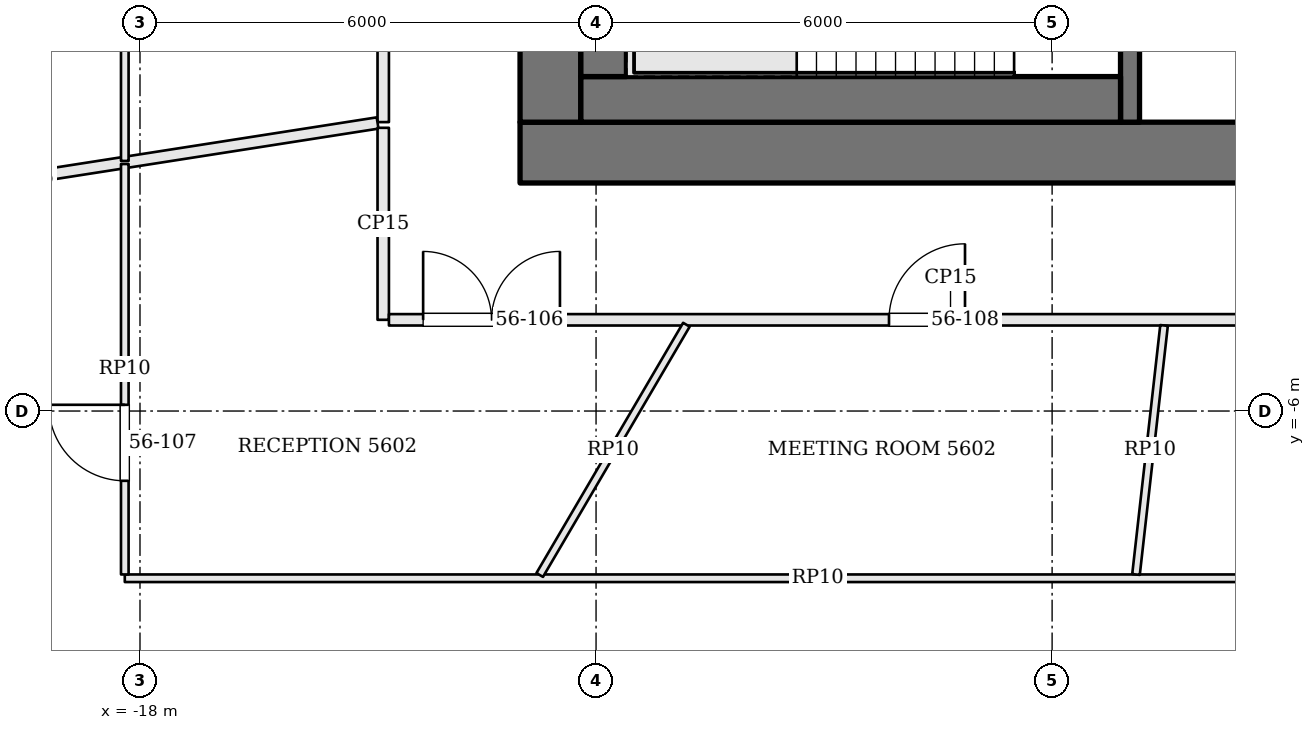
"""IFC4 building model, lengths in metres.
Left out: names, types, materials, properties, quantities, classifications, styles, units other than length and angle.
Written with IfcOpenShell. Run it as: python <this file> out.ifc"""

import sys

from ifc_helpers import new_model, si_unit, direction, frame, frame_2d, origin, place, context, subcontext, project, spatial, rectangle, extrude, element, fill, save


model = new_model("IFC4")
c1 = context("Model", 3, precision=1e-05, world=origin(), true_north=direction((0.0, 1.0)))
c2 = subcontext(c1, "Body", "Model", "MODEL_VIEW")
j1 = project(units=[si_unit("LENGTHUNIT", "METRE"), si_unit("PLANEANGLEUNIT", "RADIAN")], contexts=[c1])
p1 = place(None, origin())
s1 = spatial("IfcSite", under=j1, at=p1, CompositionType="ELEMENT")
p2 = place(p1, origin())
s2 = spatial("IfcBuilding", under=s1, at=p2, CompositionType="ELEMENT")
p3 = place(p2, frame((0.0, 0.0, 229.2)))
s3 = spatial("IfcBuildingStorey", under=s2, at=p3, CompositionType="ELEMENT", Elevation=229.2)
p4 = place(p3, frame((-13.0, -2.6, 0.0), z_axis=(0.0, 0.0, 1.0), x_axis=(1.0, 0.0, 0.0)))
e1 = element("IfcWall", 1, at=p4, inside=s3, PredefinedType="SHEAR", context=c2, shape_type="SweptSolid", body=[
    extrude(rectangle(XDim=26.0, YDim=0.8, at=frame_2d((13.0, 0.0))), origin(), (0.0, 0.0, 1.0), 3.9),
])
p5 = place(p4, frame((9.475, 0.0, 0.0)))
e2 = element("IfcOpeningElement", 2, at=p5, cuts=e1, PredefinedType="OPENING", context=c2, shape_type="SweptSolid", body=[
    extrude(rectangle(XDim=0.9, YDim=2.1, at=frame_2d((0.45, 1.05))), frame((0.0, 0.41, 0.0), z_axis=(0.0, -1.0, 0.0), x_axis=(1.0, 0.0, 0.0)), (0.0, 0.0, 1.0), 0.82),
])
p6 = place(p4, frame((12.75, 0.0, 0.0)))
e3 = element("IfcOpeningElement", 3, at=p6, cuts=e1, PredefinedType="OPENING", context=c2, shape_type="SweptSolid", body=[
    extrude(rectangle(XDim=0.9, YDim=2.1, at=frame_2d((0.45, 1.05))), frame((0.0, 0.41, 0.0), z_axis=(0.0, -1.0, 0.0), x_axis=(1.0, 0.0, 0.0)), (0.0, 0.0, 1.0), 0.82),
])
p7 = place(p4, frame((15.05, 0.0, 0.0)))
e4 = element("IfcOpeningElement", 4, at=p7, cuts=e1, PredefinedType="OPENING", context=c2, shape_type="SweptSolid", body=[
    extrude(rectangle(XDim=1.0, YDim=2.1, at=frame_2d((0.5, 1.05))), frame((0.0, 0.41, 0.0), z_axis=(0.0, -1.0, 0.0), x_axis=(1.0, 0.0, 0.0)), (0.0, 0.0, 1.0), 0.82),
])
p8 = place(p4, frame((16.825, 0.0, 0.0)))
e5 = element("IfcOpeningElement", 5, at=p8, cuts=e1, PredefinedType="OPENING", context=c2, shape_type="SweptSolid", body=[
    extrude(rectangle(XDim=0.7, YDim=2.1, at=frame_2d((0.35, 1.05))), frame((0.0, 0.41, 0.0), z_axis=(0.0, -1.0, 0.0), x_axis=(1.0, 0.0, 0.0)), (0.0, 0.0, 1.0), 0.82),
])
p9 = place(p3, frame((-12.6, -2.2, 0.0), z_axis=(0.0, 0.0, 1.0), x_axis=(0.0, 1.0, 0.0)))
e6 = element("IfcWall", 6, at=p9, inside=s3, PredefinedType="SHEAR", context=c2, shape_type="SweptSolid", body=[
    extrude(rectangle(XDim=13.4, YDim=0.8, at=frame_2d((6.7, 0.0))), origin(), (0.0, 0.0, 1.0), 3.9),
])
p10 = place(p9, frame((4.2, 0.0, 0.0)))
e7 = element("IfcOpeningElement", 7, at=p10, cuts=e6, PredefinedType="OPENING", context=c2, shape_type="SweptSolid", body=[
    extrude(rectangle(XDim=1.8, YDim=2.1, at=frame_2d((0.9, 1.05))), frame((0.0, 0.41, 0.0), z_axis=(0.0, -1.0, 0.0), x_axis=(1.0, 0.0, 0.0)), (0.0, 0.0, 1.0), 0.82),
])
p11 = place(p3, frame((-4.975, -2.2, 0.0), z_axis=(0.0, 0.0, 1.0), x_axis=(0.0, 1.0, 0.0)))
e8 = element("IfcWall", 8, at=p11, inside=s3, PredefinedType="SOLIDWALL", context=c2, shape_type="SweptSolid", body=[
    extrude(rectangle(XDim=13.4, YDim=0.25, at=frame_2d((6.7, 0.0))), origin(), (0.0, 0.0, 1.0), 3.7),
])
p12 = place(p11, frame((5.25, 0.0, 0.0)))
e9 = element("IfcOpeningElement", 9, at=p12, cuts=e8, PredefinedType="OPENING", context=c2, shape_type="SweptSolid", body=[
    extrude(rectangle(XDim=1.2, YDim=2.1, at=frame_2d((0.6, 1.05))), frame((0.0, 0.135, 0.0), z_axis=(0.0, -1.0, 0.0), x_axis=(1.0, 0.0, 0.0)), (0.0, 0.0, 1.0), 0.27),
])
p13 = place(p3, frame((-12.2, -1.9, 0.0), z_axis=(0.0, 0.0, 1.0), x_axis=(1.0, 0.0, 0.0)))
e10 = element("IfcWall", 10, at=p13, inside=s3, PredefinedType="SOLIDWALL", context=c2, shape_type="SweptSolid", body=[
    extrude(rectangle(XDim=7.1, YDim=0.6, at=frame_2d((3.55, 0.0))), origin(), (0.0, 0.0, 1.0), 3.7),
])
p14 = place(p3, frame((-11.9, -1.6, 0.0), z_axis=(0.0, 0.0, 1.0), x_axis=(0.0, 1.0, 0.0)))
e11 = element("IfcWall", 11, at=p14, inside=s3, PredefinedType="SOLIDWALL", context=c2, shape_type="SweptSolid", body=[
    extrude(rectangle(XDim=2.95, YDim=0.6, at=frame_2d((1.475, 0.0))), origin(), (0.0, 0.0, 1.0), 3.7),
])
p15 = place(p3, frame((-14.8, 13.725, 0.0), z_axis=(0.0, 0.0, 1.0), x_axis=(0.0, -1.0, 0.0)))
e12 = element("IfcWall", 12, at=p15, inside=s3, PredefinedType="PARTITIONING", context=c2, shape_type="SweptSolid", body=[
    extrude(rectangle(XDim=15.924, YDim=0.15, at=frame_2d((7.962, 0.0))), origin(), (0.0, 0.0, 1.0), 3.084),
])
p16 = place(p15, frame((0.57, 0.0, 0.0)))
e13 = element("IfcOpeningElement", 13, at=p16, cuts=e12, PredefinedType="OPENING", context=c2, shape_type="SweptSolid", body=[
    extrude(rectangle(XDim=1.0, YDim=2.4, at=frame_2d((0.5, 1.2))), frame((0.0, 0.085, 0.0), z_axis=(0.0, -1.0, 0.0), x_axis=(1.0, 0.0, 0.0)), (0.0, 0.0, 1.0), 0.17),
])
p17 = place(p3, frame((-24.077, -3.648, 0.0), z_axis=(0.0, 0.0, 1.0), x_axis=(0.988026771809, 0.154282527163, 0.0)))
e14 = element("IfcWall", 14, at=p17, inside=s3, PredefinedType="PARTITIONING", context=c2, shape_type="SweptSolid", body=[
    extrude(rectangle(XDim=9.314, YDim=0.15, at=frame_2d((4.657, 0.0))), origin(), (0.0, 0.0, 1.0), 3.234),
])
p18 = place(p3, frame((-14.8, -2.274, 0.0), z_axis=(0.0, 0.0, 1.0), x_axis=(0.0, -1.0, 0.0)))
e15 = element("IfcWall", 15, at=p18, inside=s3, PredefinedType="PARTITIONING", context=c2, shape_type="SweptSolid", body=[
    extrude(rectangle(XDim=2.526, YDim=0.15, at=frame_2d((1.263, 0.0))), origin(), (0.0, 0.0, 1.0), 3.084),
])
p19 = place(p3, frame((-14.725, -4.8, 0.0), z_axis=(0.0, 0.0, 1.0), x_axis=(1.0, 0.0, 0.0)))
e16 = element("IfcWall", 16, at=p19, inside=s3, PredefinedType="PARTITIONING", context=c2, shape_type="SweptSolid", body=[
    extrude(rectangle(XDim=14.777, YDim=0.15, at=frame_2d((7.389, 0.0))), origin(), (0.0, 0.0, 1.0), 3.084),
])
p20 = place(p19, frame((0.45, 0.0, 0.0)))
e17 = element("IfcOpeningElement", 17, at=p20, cuts=e16, PredefinedType="OPENING", context=c2, shape_type="SweptSolid", body=[
    extrude(rectangle(XDim=1.8, YDim=2.1, at=frame_2d((0.9, 1.05))), frame((0.0, 0.085, 0.0), z_axis=(0.0, -1.0, 0.0), x_axis=(1.0, 0.0, 0.0)), (0.0, 0.0, 1.0), 0.17),
])
p21 = place(p19, frame((6.579, 0.0, 0.0)))
e18 = element("IfcOpeningElement", 18, at=p21, cuts=e16, PredefinedType="OPENING", context=c2, shape_type="SweptSolid", body=[
    extrude(rectangle(XDim=1.0, YDim=2.4, at=frame_2d((0.5, 1.2))), frame((0.0, 0.085, 0.0), z_axis=(0.0, -1.0, 0.0), x_axis=(1.0, 0.0, 0.0)), (0.0, 0.0, 1.0), 0.17),
])
p22 = place(p3, frame((-18.2, -2.71, 0.0), z_axis=(0.0, 0.0, 1.0), x_axis=(0.0, 1.0, 0.0)))
e19 = element("IfcWall", 19, at=p22, inside=s3, PredefinedType="PARTITIONING", context=c2, shape_type="SweptSolid", body=[
    extrude(rectangle(XDim=17.561, YDim=0.1, at=frame_2d((8.781, 0.0))), origin(), (0.0, 0.0, 1.0), 3.084),
])
p23 = place(p22, frame((8.778, 0.0, 0.0)))
e20 = element("IfcOpeningElement", 20, at=p23, cuts=e19, PredefinedType="OPENING", context=c2, shape_type="SweptSolid", body=[
    extrude(rectangle(XDim=0.9, YDim=2.1, at=frame_2d((0.45, 1.05))), frame((0.0, 0.06, 0.0), z_axis=(0.0, -1.0, 0.0), x_axis=(1.0, 0.0, 0.0)), (0.0, 0.0, 1.0), 0.12),
])
p24 = place(p22, frame((2.883, 0.0, 0.0)))
e21 = element("IfcOpeningElement", 21, at=p24, cuts=e19, PredefinedType="OPENING", context=c2, shape_type="SweptSolid", body=[
    extrude(rectangle(XDim=0.9, YDim=2.1, at=frame_2d((0.45, 1.05))), frame((0.0, 0.06, 0.0), z_axis=(0.0, -1.0, 0.0), x_axis=(1.0, 0.0, 0.0)), (0.0, 0.0, 1.0), 0.12),
])
p25 = place(p3, frame((0.034, -8.2, 0.0), z_axis=(0.0, 0.0, 1.0), x_axis=(-1.0, 0.0, 0.0)))
e22 = element("IfcWall", 22, at=p25, inside=s3, PredefinedType="PARTITIONING", context=c2, shape_type="SweptSolid", body=[
    extrude(rectangle(XDim=18.234, YDim=0.1, at=frame_2d((9.117, 0.0))), origin(), (0.0, 0.0, 1.0), 3.084),
])
p26 = place(p25, frame((2.31, 0.0, 0.0)))
e23 = element("IfcOpeningElement", 23, at=p26, cuts=e22, PredefinedType="OPENING", context=c2, shape_type="SweptSolid", body=[
    extrude(rectangle(XDim=0.9, YDim=2.1, at=frame_2d((0.45, 1.05))), frame((0.0, 0.06, 0.0), z_axis=(0.0, -1.0, 0.0), x_axis=(1.0, 0.0, 0.0)), (0.0, 0.0, 1.0), 0.12),
])
p27 = place(p3, frame((-18.2, -8.15, 0.0), z_axis=(0.0, 0.0, 1.0), x_axis=(0.0, 1.0, 0.0)))
e24 = element("IfcWall", 24, at=p27, inside=s3, PredefinedType="PARTITIONING", context=c2, shape_type="SweptSolid", body=[
    extrude(rectangle(XDim=5.4, YDim=0.1, at=frame_2d((2.7, 0.0))), origin(), (0.0, 0.0, 1.0), 3.084),
])
p28 = place(p27, frame((1.232, 0.0, 0.0)))
e25 = element("IfcOpeningElement", 25, at=p28, cuts=e24, PredefinedType="OPENING", context=c2, shape_type="SweptSolid", body=[
    extrude(rectangle(XDim=1.0, YDim=2.1, at=frame_2d((0.5, 1.05))), frame((0.0, 0.06, 0.0), z_axis=(0.0, -1.0, 0.0), x_axis=(1.0, 0.0, 0.0)), (0.0, 0.0, 1.0), 0.12),
])
p29 = place(p3, frame((-10.811, -4.865, 0.0), z_axis=(0.0, 0.0, 1.0), x_axis=(-0.505719499712, -0.862697970098, 0.0)))
e26 = element("IfcWall", 26, at=p29, inside=s3, PredefinedType="PARTITIONING", context=c2, shape_type="SweptSolid", body=[
    extrude(rectangle(XDim=3.816, YDim=0.1, at=frame_2d((1.908, 0.0))), origin(), (0.0, 0.0, 1.0), 3.084),
])
p30 = place(p3, frame((-4.527, -4.875, 0.0), z_axis=(0.0, 0.0, 1.0), x_axis=(-0.111902643695, -0.993719174784, 0.0)))
e27 = element("IfcWall", 27, at=p30, inside=s3, PredefinedType="PARTITIONING", context=c2, shape_type="SweptSolid", body=[
    extrude(rectangle(XDim=3.297, YDim=0.1, at=frame_2d((1.648, 0.0))), origin(), (0.0, 0.0, 1.0), 3.084),
])
p31 = place(p20, origin())
e28 = element("IfcDoor", 28, at=p31, inside=s3, OperationType="DOUBLE_DOOR_SINGLE_SWING", PredefinedType="DOOR", context=c2, shape_type="SweptSolid", body=[
    extrude(rectangle(XDim=1.8, YDim=2.1, at=frame_2d((0.9, 1.05))), frame((0.0, 0.025, 0.0), z_axis=(0.0, -1.0, 0.0), x_axis=(1.0, 0.0, 0.0)), (0.0, 0.0, 1.0), 0.05),
])
fill(e17, e28)
p32 = place(p28, origin())
e29 = element("IfcDoor", 29, at=p32, inside=s3, OperationType="SINGLE_SWING_RIGHT", PredefinedType="DOOR", context=c2, shape_type="SweptSolid", body=[
    extrude(rectangle(XDim=1.0, YDim=2.1, at=frame_2d((0.5, 1.05))), frame((0.0, 0.025, 0.0), z_axis=(0.0, -1.0, 0.0), x_axis=(1.0, 0.0, 0.0)), (0.0, 0.0, 1.0), 0.05),
])
fill(e25, e29)
p33 = place(p21, origin())
e30 = element("IfcDoor", 30, at=p33, inside=s3, OperationType="SINGLE_SWING_RIGHT", PredefinedType="DOOR", context=c2, shape_type="SweptSolid", body=[
    extrude(rectangle(XDim=1.0, YDim=2.4, at=frame_2d((0.5, 1.2))), frame((0.0, 0.025, 0.0), z_axis=(0.0, -1.0, 0.0), x_axis=(1.0, 0.0, 0.0)), (0.0, 0.0, 1.0), 0.05),
])
fill(e18, e30)
save(model, sys.argv[1])
